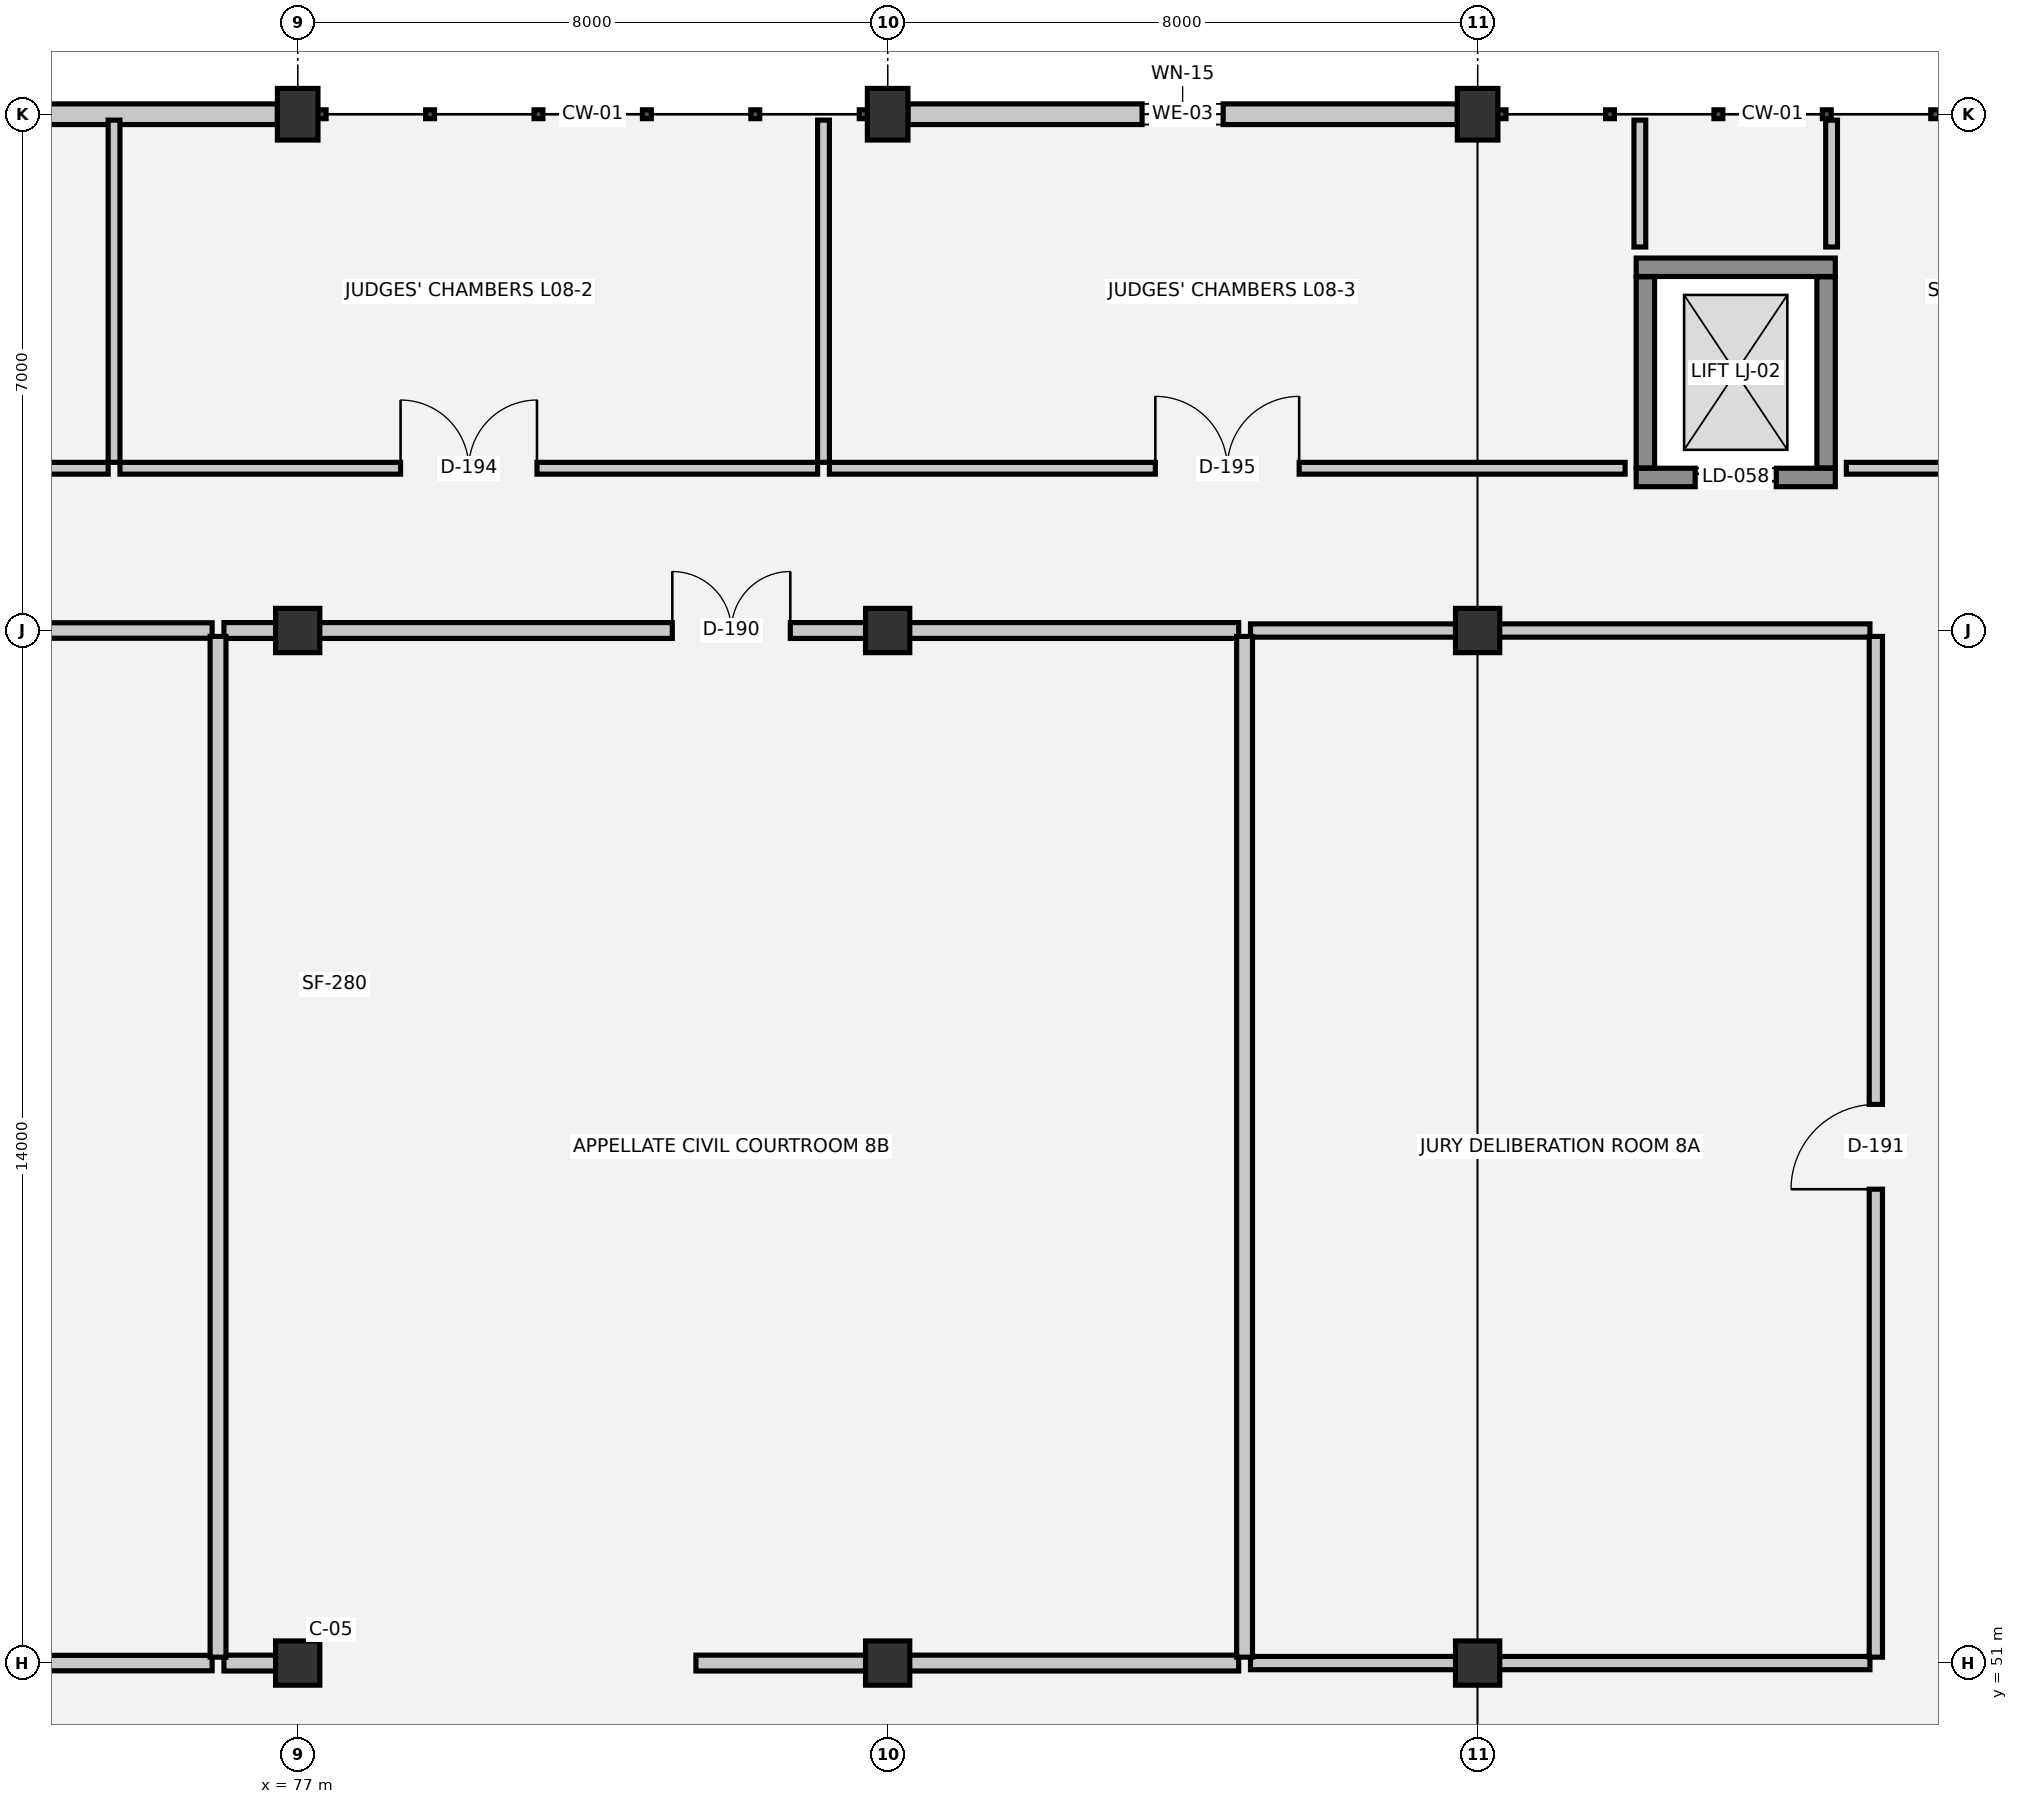
"""IFC4 building model, lengths in metres.
Left out: names, types, materials, properties, quantities, classifications, styles, units other than length and angle.
Written with IfcOpenShell. Run it as: python <this file> out.ifc"""

import sys

from ifc_helpers import new_model, si_unit, direction, frame, frame_2d, origin, origin_2d, place, context, subcontext, project, spatial, rectangle, extrude, element, fill, save


model = new_model("IFC4")
c1 = context("Model", 3, precision=1e-05, world=origin(), true_north=direction((0.0, 1.0)))
c2 = subcontext(c1, "Body", "Model", "MODEL_VIEW")
j1 = project(units=[si_unit("LENGTHUNIT", "METRE"), si_unit("PLANEANGLEUNIT", "RADIAN")], contexts=[c1])
p1 = place(None, origin())
s1 = spatial("IfcSite", under=j1, at=p1, CompositionType="ELEMENT")
p2 = place(p1, origin())
s2 = spatial("IfcBuilding", under=s1, at=p2, CompositionType="ELEMENT")
p3 = place(p2, frame((0.0, 0.0, 29.55)))
s3 = spatial("IfcBuildingStorey", under=s2, at=p3, CompositionType="ELEMENT", Elevation=29.55)
for number, where, z_axis, x_axis in (
    (1, (77.0, 51.0, 0.0), (0.0, 0.0, 1.0), (1.0, 0.0, 0.0)),
    (2, (77.0, 65.0, 0.0), (0.0, 0.0, 1.0), (1.0, 0.0, 0.0)),
):
    element("IfcColumn", number, at=place(p3, frame(where, z_axis=z_axis, x_axis=x_axis)), inside=s3, PredefinedType="COLUMN", context=c2, shape_type="SweptSolid", body=[
        extrude(rectangle(XDim=0.6, YDim=0.6, at=origin_2d()), origin(), (0.0, 0.0, 1.0), 3.75),
    ])
p4 = place(p3, frame((77.0, 72.0, 0.0), z_axis=(0.0, 0.0, 1.0), x_axis=(1.0, 0.0, 0.0)))
e3 = element("IfcColumn", 3, at=p4, inside=s3, PredefinedType="COLUMN", context=c2, shape_type="SweptSolid", body=[
    extrude(rectangle(XDim=0.55, YDim=0.7, at=origin_2d()), origin(), (0.0, 0.0, 1.0), 3.75),
])
for number, where, z_axis, x_axis in (
    (4, (85.0, 51.0, 0.0), (0.0, 0.0, 1.0), (1.0, 0.0, 0.0)),
    (5, (85.0, 65.0, 0.0), (0.0, 0.0, 1.0), (1.0, 0.0, 0.0)),
):
    element("IfcColumn", number, at=place(p3, frame(where, z_axis=z_axis, x_axis=x_axis)), inside=s3, PredefinedType="COLUMN", context=c2, shape_type="SweptSolid", body=[
        extrude(rectangle(XDim=0.6, YDim=0.6, at=origin_2d()), origin(), (0.0, 0.0, 1.0), 3.75),
    ])
p5 = place(p3, frame((85.0, 72.0, 0.0), z_axis=(0.0, 0.0, 1.0), x_axis=(1.0, 0.0, 0.0)))
e6 = element("IfcColumn", 6, at=p5, inside=s3, PredefinedType="COLUMN", context=c2, shape_type="SweptSolid", body=[
    extrude(rectangle(XDim=0.55, YDim=0.7, at=origin_2d()), origin(), (0.0, 0.0, 1.0), 3.75),
])
for number, where, z_axis, x_axis in (
    (7, (93.0, 51.0, 0.0), (0.0, 0.0, 1.0), (1.0, 0.0, 0.0)),
    (8, (93.0, 65.0, 0.0), (0.0, 0.0, 1.0), (1.0, 0.0, 0.0)),
):
    element("IfcColumn", number, at=place(p3, frame(where, z_axis=z_axis, x_axis=x_axis)), inside=s3, PredefinedType="COLUMN", context=c2, shape_type="SweptSolid", body=[
        extrude(rectangle(XDim=0.6, YDim=0.6, at=origin_2d()), origin(), (0.0, 0.0, 1.0), 3.75),
    ])
p6 = place(p3, frame((93.0, 72.0, 0.0), z_axis=(0.0, 0.0, 1.0), x_axis=(1.0, 0.0, 0.0)))
e9 = element("IfcColumn", 9, at=p6, inside=s3, PredefinedType="COLUMN", context=c2, shape_type="SweptSolid", body=[
    extrude(rectangle(XDim=0.55, YDim=0.7, at=origin_2d()), origin(), (0.0, 0.0, 1.0), 3.75),
])
p7 = place(p3, frame((69.275, 72.0, 0.0), z_axis=(0.0, 0.0, 1.0), x_axis=(1.0, 0.0, 0.0)))
e10 = element("IfcWall", 10, at=p7, inside=s3, PredefinedType="SOLIDWALL", context=c2, shape_type="SweptSolid", body=[
    extrude(rectangle(XDim=7.45, YDim=0.28, at=frame_2d((3.725, 0.0))), origin(), (0.0, 0.0, 1.0), 2.56),
])
p8 = place(p7, frame((3.175, 0.0, 1.0)))
e11 = element("IfcOpeningElement", 11, at=p8, cuts=e10, PredefinedType="OPENING", context=c2, shape_type="SweptSolid", body=[
    extrude(rectangle(XDim=1.1, YDim=1.2, at=frame_2d((0.55, 0.6))), frame((0.0, 0.15, 0.0), z_axis=(0.0, -1.0, 0.0), x_axis=(1.0, 0.0, 0.0)), (0.0, 0.0, 1.0), 0.3),
])
p9 = place(p3, frame((85.275, 72.0, 0.0), z_axis=(0.0, 0.0, 1.0), x_axis=(1.0, 0.0, 0.0)))
e12 = element("IfcWall", 12, at=p9, inside=s3, PredefinedType="SOLIDWALL", context=c2, shape_type="SweptSolid", body=[
    extrude(rectangle(XDim=7.45, YDim=0.28, at=frame_2d((3.725, 0.0))), origin(), (0.0, 0.0, 1.0), 2.56),
])
p10 = place(p9, frame((3.175, 0.0, 1.0)))
e13 = element("IfcOpeningElement", 13, at=p10, cuts=e12, PredefinedType="OPENING", context=c2, shape_type="SweptSolid", body=[
    extrude(rectangle(XDim=1.1, YDim=1.2, at=frame_2d((0.55, 0.6))), frame((0.0, 0.15, 0.0), z_axis=(0.0, -1.0, 0.0), x_axis=(1.0, 0.0, 0.0)), (0.0, 0.0, 1.0), 0.3),
])
p11 = place(p3, frame((95.15, 67.075, 0.0), z_axis=(0.0, 0.0, 1.0), x_axis=(1.0, 0.0, 0.0)))
e14 = element("IfcWall", 14, at=p11, inside=s3, PredefinedType="SHEAR", context=c2, shape_type="SweptSolid", body=[
    extrude(rectangle(XDim=2.7, YDim=0.25, at=frame_2d((1.35, 0.0))), origin(), (0.0, 0.0, 1.0), 3.75),
])
p12 = place(p11, frame((0.8, 0.0, 0.0)))
e15 = element("IfcOpeningElement", 15, at=p12, cuts=e14, PredefinedType="OPENING", context=c2, shape_type="SweptSolid", body=[
    extrude(rectangle(XDim=1.1, YDim=2.15, at=frame_2d((0.55, 1.075))), frame((0.0, 0.135, 0.0), z_axis=(0.0, -1.0, 0.0), x_axis=(1.0, 0.0, 0.0)), (0.0, 0.0, 1.0), 0.27),
])
p13 = place(p3, frame((97.85, 69.925, 0.0), z_axis=(0.0, 0.0, 1.0), x_axis=(-1.0, 0.0, 0.0)))
e16 = element("IfcWall", 16, at=p13, inside=s3, PredefinedType="SHEAR", context=c2, shape_type="SweptSolid", body=[
    extrude(rectangle(XDim=2.7, YDim=0.25, at=frame_2d((1.35, 0.0))), origin(), (0.0, 0.0, 1.0), 3.75),
])
for number, where, z_axis, x_axis in (
    (17, (95.275, 69.795, 0.0), (0.0, 0.0, 1.0), (0.0, -1.0, 0.0)),
    (18, (97.725, 67.205, 0.0), (0.0, 0.0, 1.0), (0.0, 1.0, 0.0)),
):
    element("IfcWall", number, at=place(p3, frame(where, z_axis=z_axis, x_axis=x_axis)), inside=s3, PredefinedType="SHEAR", context=c2, shape_type="SweptSolid", body=[
        extrude(rectangle(XDim=2.59, YDim=0.25, at=frame_2d((1.295, 0.0))), origin(), (0.0, 0.0, 1.0), 3.75),
    ])
p14 = place(p3, frame((62.08, 51.0, 0.0), z_axis=(0.0, 0.0, 1.0), x_axis=(1.0, 0.0, 0.0)))
e19 = element("IfcWall", 19, at=p14, inside=s3, PredefinedType="PARTITIONING", context=c2, shape_type="SweptSolid", body=[
    extrude(rectangle(XDim=13.76, YDim=0.21, at=frame_2d((6.88, 0.0))), origin(), (0.0, 0.0, 1.0), 2.78),
])
p15 = place(p14, frame((4.378, 0.0, 0.0)))
e20 = element("IfcOpeningElement", 20, at=p15, cuts=e19, PredefinedType="OPENING", context=c2, shape_type="SweptSolid", body=[
    extrude(rectangle(XDim=1.55, YDim=2.25, at=frame_2d((0.775, 1.125))), frame((0.0, 0.115, 0.0), z_axis=(0.0, -1.0, 0.0), x_axis=(1.0, 0.0, 0.0)), (0.0, 0.0, 1.0), 0.23),
])
p16 = place(p3, frame((76.0, 51.0, 0.0), z_axis=(0.0, 0.0, 1.0), x_axis=(1.0, 0.0, 0.0)))
e21 = element("IfcWall", 21, at=p16, inside=s3, PredefinedType="PARTITIONING", context=c2, shape_type="SweptSolid", body=[
    extrude(rectangle(XDim=1.2, YDim=0.215, at=frame_2d((0.6, 0.0))), origin(), (0.0, 0.0, 1.0), 2.78),
])
p17 = place(p3, frame((82.4, 51.0, 0.0), z_axis=(0.0, 0.0, 1.0), x_axis=(1.0, 0.0, 0.0)))
e22 = element("IfcWall", 22, at=p17, inside=s3, PredefinedType="PARTITIONING", context=c2, shape_type="SweptSolid", body=[
    extrude(rectangle(XDim=7.36, YDim=0.215, at=frame_2d((3.68, 0.0))), origin(), (0.0, 0.0, 1.0), 2.78),
])
p18 = place(p3, frame((89.92, 51.0, 0.0), z_axis=(0.0, 0.0, 1.0), x_axis=(1.0, 0.0, 0.0)))
e23 = element("IfcWall", 23, at=p18, inside=s3, PredefinedType="PARTITIONING", context=c2, shape_type="SweptSolid", body=[
    extrude(rectangle(XDim=8.4, YDim=0.18, at=frame_2d((4.2, 0.0))), origin(), (0.0, 0.0, 1.0), 2.78),
])
p19 = place(p3, frame((62.08, 65.0, 0.0), z_axis=(0.0, 0.0, 1.0), x_axis=(1.0, 0.0, 0.0)))
e24 = element("IfcWall", 24, at=p19, inside=s3, PredefinedType="PARTITIONING", context=c2, shape_type="SweptSolid", body=[
    extrude(rectangle(XDim=13.76, YDim=0.21, at=frame_2d((6.88, 0.0))), origin(), (0.0, 0.0, 1.0), 2.78),
])
p20 = place(p3, frame((76.0, 65.0, 0.0), z_axis=(0.0, 0.0, 1.0), x_axis=(1.0, 0.0, 0.0)))
e25 = element("IfcWall", 25, at=p20, inside=s3, PredefinedType="PARTITIONING", context=c2, shape_type="SweptSolid", body=[
    extrude(rectangle(XDim=13.76, YDim=0.215, at=frame_2d((6.88, 0.0))), origin(), (0.0, 0.0, 1.0), 2.78),
])
p21 = place(p20, frame((6.08, 0.0, 0.0)))
e26 = element("IfcOpeningElement", 26, at=p21, cuts=e25, PredefinedType="OPENING", context=c2, shape_type="SweptSolid", body=[
    extrude(rectangle(XDim=1.6, YDim=2.25, at=frame_2d((0.8, 1.125))), frame((0.0, 0.117, 0.0), z_axis=(0.0, -1.0, 0.0), x_axis=(1.0, 0.0, 0.0)), (0.0, 0.0, 1.0), 0.235),
])
p22 = place(p3, frame((89.92, 65.0, 0.0), z_axis=(0.0, 0.0, 1.0), x_axis=(1.0, 0.0, 0.0)))
e27 = element("IfcWall", 27, at=p22, inside=s3, PredefinedType="PARTITIONING", context=c2, shape_type="SweptSolid", body=[
    extrude(rectangle(XDim=8.4, YDim=0.18, at=frame_2d((4.2, 0.0))), origin(), (0.0, 0.0, 1.0), 2.78),
])
p23 = place(p3, frame((62.08, 67.2, 0.0), z_axis=(0.0, 0.0, 1.0), x_axis=(1.0, 0.0, 0.0)))
e28 = element("IfcWall", 28, at=p23, inside=s3, PredefinedType="PARTITIONING", context=c2, shape_type="SweptSolid", body=[
    extrude(rectangle(XDim=12.35, YDim=0.16, at=frame_2d((6.175, 0.0))), origin(), (0.0, 0.0, 1.0), 3.39),
])
p24 = place(p23, frame((2.41, 0.0, 0.0)))
e29 = element("IfcOpeningElement", 29, at=p24, cuts=e28, PredefinedType="OPENING", context=c2, shape_type="SweptSolid", body=[
    extrude(rectangle(XDim=1.75, YDim=2.3, at=frame_2d((0.875, 1.15))), frame((0.0, 0.09, 0.0), z_axis=(0.0, -1.0, 0.0), x_axis=(1.0, 0.0, 0.0)), (0.0, 0.0, 1.0), 0.18),
])
p25 = place(p3, frame((74.59, 67.2, 0.0), z_axis=(0.0, 0.0, 1.0), x_axis=(1.0, 0.0, 0.0)))
e30 = element("IfcWall", 30, at=p25, inside=s3, PredefinedType="PARTITIONING", context=c2, shape_type="SweptSolid", body=[
    extrude(rectangle(XDim=9.46, YDim=0.16, at=frame_2d((4.73, 0.0))), origin(), (0.0, 0.0, 1.0), 3.39),
])
p26 = place(p25, frame((3.805, 0.0, 0.0)))
e31 = element("IfcOpeningElement", 31, at=p26, cuts=e30, PredefinedType="OPENING", context=c2, shape_type="SweptSolid", body=[
    extrude(rectangle(XDim=1.85, YDim=2.3, at=frame_2d((0.925, 1.15))), frame((0.0, 0.09, 0.0), z_axis=(0.0, -1.0, 0.0), x_axis=(1.0, 0.0, 0.0)), (0.0, 0.0, 1.0), 0.18),
])
p27 = place(p3, frame((84.21, 67.2, 0.0), z_axis=(0.0, 0.0, 1.0), x_axis=(1.0, 0.0, 0.0)))
e32 = element("IfcWall", 32, at=p27, inside=s3, PredefinedType="PARTITIONING", context=c2, shape_type="SweptSolid", body=[
    extrude(rectangle(XDim=10.79, YDim=0.16, at=frame_2d((5.395, 0.0))), origin(), (0.0, 0.0, 1.0), 3.39),
])
p28 = place(p27, frame((4.42, 0.0, 0.0)))
e33 = element("IfcOpeningElement", 33, at=p28, cuts=e32, PredefinedType="OPENING", context=c2, shape_type="SweptSolid", body=[
    extrude(rectangle(XDim=1.95, YDim=2.35, at=frame_2d((0.975, 1.175))), frame((0.0, 0.09, 0.0), z_axis=(0.0, -1.0, 0.0), x_axis=(1.0, 0.0, 0.0)), (0.0, 0.0, 1.0), 0.18),
])
p29 = place(p3, frame((98.0, 67.2, 0.0), z_axis=(0.0, 0.0, 1.0), x_axis=(1.0, 0.0, 0.0)))
e34 = element("IfcWall", 34, at=p29, inside=s3, PredefinedType="PARTITIONING", context=c2, shape_type="SweptSolid", body=[
    extrude(rectangle(XDim=6.72, YDim=0.16, at=frame_2d((3.36, 0.0))), origin(), (0.0, 0.0, 1.0), 3.39),
])
p30 = place(p29, frame((2.335, 0.0, 0.0)))
e35 = element("IfcOpeningElement", 35, at=p30, cuts=e34, PredefinedType="OPENING", context=c2, shape_type="SweptSolid", body=[
    extrude(rectangle(XDim=2.05, YDim=2.35, at=frame_2d((1.025, 1.175))), frame((0.0, 0.09, 0.0), z_axis=(0.0, -1.0, 0.0), x_axis=(1.0, 0.0, 0.0)), (0.0, 0.0, 1.0), 0.18),
])
p31 = place(p3, frame((74.51, 67.28, 0.0), z_axis=(0.0, 0.0, 1.0), x_axis=(0.0, 1.0, 0.0)))
e36 = element("IfcWall", 36, at=p31, inside=s3, PredefinedType="PARTITIONING", context=c2, shape_type="SweptSolid", body=[
    extrude(rectangle(XDim=4.64, YDim=0.16, at=frame_2d((2.32, 0.0))), origin(), (0.0, 0.0, 1.0), 3.39),
])
p32 = place(p3, frame((75.92, 51.08, 0.0), z_axis=(0.0, 0.0, 1.0), x_axis=(0.0, 1.0, 0.0)))
e37 = element("IfcWall", 37, at=p32, inside=s3, PredefinedType="PARTITIONING", context=c2, shape_type="SweptSolid", body=[
    extrude(rectangle(XDim=13.84, YDim=0.215, at=frame_2d((6.92, 0.0))), origin(), (0.0, 0.0, 1.0), 3.39),
])
p33 = place(p3, frame((84.13, 67.28, 0.0), z_axis=(0.0, 0.0, 1.0), x_axis=(0.0, 1.0, 0.0)))
e38 = element("IfcWall", 38, at=p33, inside=s3, PredefinedType="PARTITIONING", context=c2, shape_type="SweptSolid", body=[
    extrude(rectangle(XDim=4.64, YDim=0.16, at=frame_2d((2.32, 0.0))), origin(), (0.0, 0.0, 1.0), 3.39),
])
p34 = place(p3, frame((89.84, 51.08, 0.0), z_axis=(0.0, 0.0, 1.0), x_axis=(0.0, 1.0, 0.0)))
e39 = element("IfcWall", 39, at=p34, inside=s3, PredefinedType="PARTITIONING", context=c2, shape_type="SweptSolid", body=[
    extrude(rectangle(XDim=13.84, YDim=0.215, at=frame_2d((6.92, 0.0))), origin(), (0.0, 0.0, 1.0), 3.39),
])
for number, where, z_axis, x_axis in (
    (40, (95.2, 70.2, 0.0), (0.0, 0.0, 1.0), (0.0, 1.0, 0.0)),
    (41, (97.8, 70.2, 0.0), (0.0, 0.0, 1.0), (0.0, 1.0, 0.0)),
):
    element("IfcWall", number, at=place(p3, frame(where, z_axis=z_axis, x_axis=x_axis)), inside=s3, PredefinedType="PARTITIONING", context=c2, shape_type="SweptSolid", body=[
        extrude(rectangle(XDim=1.72, YDim=0.16, at=frame_2d((0.86, 0.0))), origin(), (0.0, 0.0, 1.0), 3.39),
    ])
p35 = place(p3, frame((98.4, 51.08, 0.0), z_axis=(0.0, 0.0, 1.0), x_axis=(0.0, 1.0, 0.0)))
e42 = element("IfcWall", 42, at=p35, inside=s3, PredefinedType="PARTITIONING", context=c2, shape_type="SweptSolid", body=[
    extrude(rectangle(XDim=13.84, YDim=0.18, at=frame_2d((6.92, 0.0))), origin(), (0.0, 0.0, 1.0), 3.39),
])
p36 = place(p35, frame((6.345, 0.0, 0.0)))
e43 = element("IfcOpeningElement", 43, at=p36, cuts=e42, PredefinedType="OPENING", context=c2, shape_type="SweptSolid", body=[
    extrude(rectangle(XDim=1.15, YDim=2.2, at=frame_2d((0.575, 1.1))), frame((0.0, 0.1, 0.0), z_axis=(0.0, -1.0, 0.0), x_axis=(1.0, 0.0, 0.0)), (0.0, 0.0, 1.0), 0.2),
])
p37 = place(p10, origin())
e44 = element("IfcWindow", 44, at=p37, inside=s3, PartitioningType="SINGLE_PANEL", PredefinedType="WINDOW", context=c2, shape_type="SweptSolid", body=[
    extrude(rectangle(XDim=1.1, YDim=1.2, at=frame_2d((0.55, 0.6))), frame((0.0, 0.03, 0.0), z_axis=(0.0, -1.0, 0.0), x_axis=(1.0, 0.0, 0.0)), (0.0, 0.0, 1.0), 0.06),
])
fill(e13, e44)
p38 = place(p12, origin())
e45 = element("IfcDoor", 45, at=p38, inside=s3, OperationType="DOUBLE_DOOR_SLIDING", PredefinedType="DOOR", context=c2, shape_type="SweptSolid", body=[
    extrude(rectangle(XDim=1.1, YDim=2.15, at=frame_2d((0.55, 1.075))), frame((0.0, 0.025, 0.0), z_axis=(0.0, -1.0, 0.0), x_axis=(1.0, 0.0, 0.0)), (0.0, 0.0, 1.0), 0.05),
])
fill(e15, e45)
p39 = place(p21, origin())
e46 = element("IfcDoor", 46, at=p39, inside=s3, OperationType="DOUBLE_DOOR_SINGLE_SWING", PredefinedType="DOOR", context=c2, shape_type="SweptSolid", body=[
    extrude(rectangle(XDim=1.6, YDim=2.25, at=frame_2d((0.8, 1.125))), frame((0.0, 0.025, 0.0), z_axis=(0.0, -1.0, 0.0), x_axis=(1.0, 0.0, 0.0)), (0.0, 0.0, 1.0), 0.05),
])
fill(e26, e46)
p40 = place(p36, origin())
e47 = element("IfcDoor", 47, at=p40, inside=s3, OperationType="SINGLE_SWING_LEFT", PredefinedType="DOOR", context=c2, shape_type="SweptSolid", body=[
    extrude(rectangle(XDim=1.15, YDim=2.2, at=frame_2d((0.575, 1.1))), frame((0.0, 0.025, 0.0), z_axis=(0.0, -1.0, 0.0), x_axis=(1.0, 0.0, 0.0)), (0.0, 0.0, 1.0), 0.05),
])
fill(e43, e47)
p41 = place(p26, origin())
e48 = element("IfcDoor", 48, at=p41, inside=s3, OperationType="DOUBLE_DOOR_SINGLE_SWING", PredefinedType="DOOR", context=c2, shape_type="SweptSolid", body=[
    extrude(rectangle(XDim=1.85, YDim=2.3, at=frame_2d((0.925, 1.15))), frame((0.0, 0.025, 0.0), z_axis=(0.0, -1.0, 0.0), x_axis=(1.0, 0.0, 0.0)), (0.0, 0.0, 1.0), 0.05),
])
fill(e31, e48)
p42 = place(p28, origin())
e49 = element("IfcDoor", 49, at=p42, inside=s3, OperationType="DOUBLE_DOOR_SINGLE_SWING", PredefinedType="DOOR", context=c2, shape_type="SweptSolid", body=[
    extrude(rectangle(XDim=1.95, YDim=2.35, at=frame_2d((0.975, 1.175))), frame((0.0, 0.025, 0.0), z_axis=(0.0, -1.0, 0.0), x_axis=(1.0, 0.0, 0.0)), (0.0, 0.0, 1.0), 0.05),
])
fill(e33, e49)
save(model, sys.argv[1])
